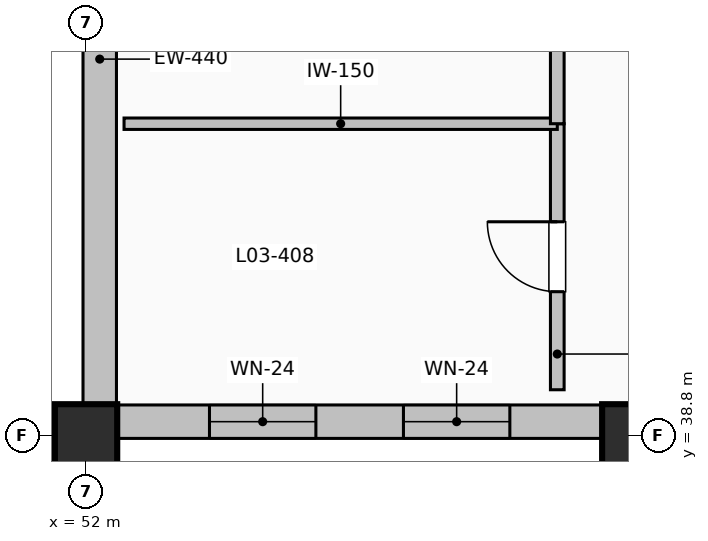
"""IFC4 building model, lengths in metres.
Left out: names, types, materials, properties, quantities, classifications, styles, units other than length and angle.
Written with IfcOpenShell. Run it as: python <this file> out.ifc"""

import sys

from ifc_helpers import new_model, si_unit, direction, frame, frame_2d, origin, origin_2d, place, context, subcontext, project, spatial, rectangle, extrude, element, fill, save


model = new_model("IFC4")
c1 = context("Model", 3, precision=1e-05, world=origin(), true_north=direction((0.0, 1.0)))
c2 = subcontext(c1, "Body", "Model", "MODEL_VIEW")
j1 = project(units=[si_unit("LENGTHUNIT", "METRE"), si_unit("PLANEANGLEUNIT", "RADIAN")], contexts=[c1])
p1 = place(None, origin())
s1 = spatial("IfcSite", under=j1, at=p1, CompositionType="ELEMENT")
p2 = place(p1, origin())
s2 = spatial("IfcBuilding", under=s1, at=p2, CompositionType="ELEMENT")
p3 = place(p2, frame((0.0, 0.0, 15.0)))
s3 = spatial("IfcBuildingStorey", under=s2, at=p3, CompositionType="ELEMENT", Elevation=15.0)
for number, where, z_axis, x_axis in (
    (1, (52.0, 38.8, 0.0), (0.0, 0.0, 1.0), (1.0, 0.0, 0.0)),
    (2, (59.2, 38.8, 0.0), (0.0, 0.0, 1.0), (1.0, 0.0, 0.0)),
):
    element("IfcColumn", number, at=place(p3, frame(where, z_axis=z_axis, x_axis=x_axis)), inside=s3, PredefinedType="COLUMN", context=c2, shape_type="SweptSolid", body=[
        extrude(rectangle(XDim=0.82, YDim=0.82, at=origin_2d()), origin(), (0.0, 0.0, 1.0), 4.5),
    ])
p4 = place(p3, frame((58.79, 38.98, 0.0), z_axis=(0.0, 0.0, 1.0), x_axis=(-1.0, 0.0, 0.0)))
e3 = element("IfcWall", 3, at=p4, inside=s3, PredefinedType="SOLIDWALL", context=c2, shape_type="SweptSolid", body=[
    extrude(rectangle(XDim=6.38, YDim=0.44, at=frame_2d((3.19, 0.0))), origin(), (0.0, 0.0, 1.0), 3.462),
])
p5 = place(p4, frame((1.214, 0.0, 1.0)))
e4 = element("IfcOpeningElement", 4, at=p5, cuts=e3, PredefinedType="OPENING", context=c2, shape_type="SweptSolid", body=[
    extrude(rectangle(XDim=1.4, YDim=1.2, at=frame_2d((0.7, 0.6))), frame((0.0, 0.23, 0.0), z_axis=(0.0, -1.0, 0.0), x_axis=(1.0, 0.0, 0.0)), (0.0, 0.0, 1.0), 0.46),
])
p6 = place(p4, frame((3.766, 0.0, 1.0)))
e5 = element("IfcOpeningElement", 5, at=p6, cuts=e3, PredefinedType="OPENING", context=c2, shape_type="SweptSolid", body=[
    extrude(rectangle(XDim=1.4, YDim=1.2, at=frame_2d((0.7, 0.6))), frame((0.0, 0.23, 0.0), z_axis=(0.0, -1.0, 0.0), x_axis=(1.0, 0.0, 0.0)), (0.0, 0.0, 1.0), 0.46),
])
p7 = place(p3, frame((52.18, 39.21, 0.0), z_axis=(0.0, 0.0, 1.0), x_axis=(0.0, 1.0, 0.0)))
e6 = element("IfcWall", 6, at=p7, inside=s3, PredefinedType="SOLIDWALL", context=c2, shape_type="SweptSolid", body=[
    extrude(rectangle(XDim=6.98, YDim=0.44, at=frame_2d((3.49, 0.0))), origin(), (0.0, 0.0, 1.0), 3.462),
])
p8 = place(p3, frame((58.2, 39.4, 0.0), z_axis=(0.0, 0.0, 1.0), x_axis=(0.0, 1.0, 0.0)))
e7 = element("IfcWall", 7, at=p8, inside=s3, PredefinedType="PARTITIONING", context=c2, shape_type="SweptSolid", body=[
    extrude(rectangle(XDim=3.5, YDim=0.18, at=frame_2d((1.75, 0.0))), origin(), (0.0, 0.0, 1.0), 4.192),
])
p9 = place(p8, frame((1.29, 0.0, 0.0)))
e8 = element("IfcOpeningElement", 8, at=p9, cuts=e7, PredefinedType="OPENING", context=c2, shape_type="SweptSolid", body=[
    extrude(rectangle(XDim=0.92, YDim=2.05, at=frame_2d((0.46, 1.025))), frame((0.0, 0.1, 0.0), z_axis=(0.0, -1.0, 0.0), x_axis=(1.0, 0.0, 0.0)), (0.0, 0.0, 1.0), 0.2),
])
p10 = place(p3, frame((52.5, 42.9, 0.0), z_axis=(0.0, 0.0, 1.0), x_axis=(1.0, 0.0, 0.0)))
e9 = element("IfcWall", 9, at=p10, inside=s3, PredefinedType="PARTITIONING", context=c2, shape_type="SweptSolid", body=[
    extrude(rectangle(XDim=5.7, YDim=0.15, at=frame_2d((2.85, 0.0))), origin(), (0.0, 0.0, 1.0), 4.192),
])
p11 = place(p3, frame((58.2, 42.9, 0.0), z_axis=(0.0, 0.0, 1.0), x_axis=(0.0, 1.0, 0.0)))
e10 = element("IfcWall", 10, at=p11, inside=s3, PredefinedType="PARTITIONING", context=c2, shape_type="SweptSolid", body=[
    extrude(rectangle(XDim=3.5, YDim=0.18, at=frame_2d((1.75, 0.0))), origin(), (0.0, 0.0, 1.0), 4.192),
])
p12 = place(p11, frame((1.29, 0.0, 0.0)))
e11 = element("IfcOpeningElement", 11, at=p12, cuts=e10, PredefinedType="OPENING", context=c2, shape_type="SweptSolid", body=[
    extrude(rectangle(XDim=0.92, YDim=2.05, at=frame_2d((0.46, 1.025))), frame((0.0, 0.1, 0.0), z_axis=(0.0, -1.0, 0.0), x_axis=(1.0, 0.0, 0.0)), (0.0, 0.0, 1.0), 0.2),
])
p13 = place(p5, origin())
e12 = element("IfcWindow", 12, at=p13, inside=s3, PartitioningType="SINGLE_PANEL", PredefinedType="WINDOW", context=c2, shape_type="SweptSolid", body=[
    extrude(rectangle(XDim=1.4, YDim=1.2, at=frame_2d((0.7, 0.6))), frame((0.0, 0.03, 0.0), z_axis=(0.0, -1.0, 0.0), x_axis=(1.0, 0.0, 0.0)), (0.0, 0.0, 1.0), 0.06),
])
fill(e4, e12)
p14 = place(p6, origin())
e13 = element("IfcWindow", 13, at=p14, inside=s3, PartitioningType="SINGLE_PANEL", PredefinedType="WINDOW", context=c2, shape_type="SweptSolid", body=[
    extrude(rectangle(XDim=1.4, YDim=1.2, at=frame_2d((0.7, 0.6))), frame((0.0, 0.03, 0.0), z_axis=(0.0, -1.0, 0.0), x_axis=(1.0, 0.0, 0.0)), (0.0, 0.0, 1.0), 0.06),
])
fill(e5, e13)
p15 = place(p9, origin())
e14 = element("IfcDoor", 14, at=p15, inside=s3, OperationType="SINGLE_SWING_RIGHT", PredefinedType="DOOR", context=c2, shape_type="SweptSolid", body=[
    extrude(rectangle(XDim=0.92, YDim=2.05, at=frame_2d((0.46, 1.025))), frame((0.0, 0.025, 0.0), z_axis=(0.0, -1.0, 0.0), x_axis=(1.0, 0.0, 0.0)), (0.0, 0.0, 1.0), 0.05),
])
fill(e8, e14)
save(model, sys.argv[1])
